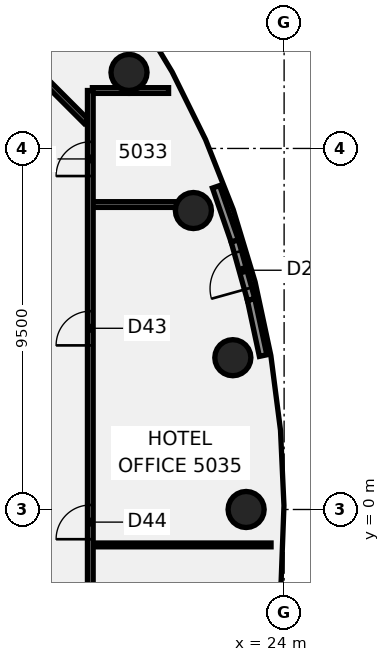
"""IFC4 building model, lengths in metres.
Left out: names, types, materials, properties, quantities, classifications, styles, units other than length and angle.
Written with IfcOpenShell. Run it as: python <this file> out.ifc"""

import sys

from ifc_helpers import new_model, si_unit, direction, frame, frame_2d, origin, origin_2d, place, context, subcontext, project, spatial, rectangle, circle, extrude, element, fill, save


model = new_model("IFC4")
c1 = context("Model", 3, precision=1e-05, world=origin(), true_north=direction((0.0, 1.0)))
c2 = subcontext(c1, "Body", "Model", "MODEL_VIEW")
j1 = project(units=[si_unit("LENGTHUNIT", "METRE"), si_unit("PLANEANGLEUNIT", "RADIAN")], contexts=[c1])
p1 = place(None, origin())
s1 = spatial("IfcSite", under=j1, at=p1, CompositionType="ELEMENT")
p2 = place(p1, origin())
s2 = spatial("IfcBuilding", under=s1, at=p2, CompositionType="ELEMENT")
p3 = place(p2, frame((0.0, 0.0, 200.5)))
s3 = spatial("IfcBuildingStorey", under=s2, at=p3, CompositionType="ELEMENT", Elevation=200.5)
for number, where, z_axis, x_axis in (
    (1, (23.0, 0.0, -0.14), (0.0, 0.0, 1.0), (1.0, 0.0, 0.0)),
    (2, (22.651, 3.994, -0.14), (0.0, 0.0, 1.0), (1.0, 0.0, 0.0)),
    (3, (21.613, 7.866, -0.14), (0.0, 0.0, 1.0), (1.0, 0.0, 0.0)),
    (4, (19.919, 11.5, -0.14), (0.0, 0.0, 1.0), (1.0, 0.0, 0.0)),
):
    element("IfcColumn", number, at=place(p3, frame(where, z_axis=z_axis, x_axis=x_axis)), inside=s3, PredefinedType="COLUMN", context=c2, shape_type="SweptSolid", body=[
        extrude(circle(Radius=0.475, at=origin_2d()), origin(), (0.0, 0.0, 1.0), 3.6),
    ])
p4 = place(p3, frame((17.128, 11.872, 0.0), z_axis=(0.0, 0.0, 1.0), x_axis=(0.707106781187, -0.707106781187, 0.0)))
e5 = element("IfcWall", 5, at=p4, inside=s3, PredefinedType="PARTITIONING", context=c2, shape_type="SweptSolid", body=[
    extrude(rectangle(XDim=2.35, YDim=0.15, at=frame_2d((1.175, 0.0))), origin(), (0.0, 0.0, 1.0), 2.864),
])
p5 = place(p3, frame((18.955, -0.932, 0.0), z_axis=(0.0, 0.0, 1.0), x_axis=(1.0, 0.0, 0.0)))
e6 = element("IfcWall", 6, at=p5, inside=s3, PredefinedType="PARTITIONING", context=c2, shape_type="SweptSolid", body=[
    extrude(rectangle(XDim=4.701, YDim=0.1, at=frame_2d((2.351, 0.0))), origin(), (0.0, 0.0, 1.0), 2.864),
])
p6 = place(p3, frame((18.955, 8.024, 0.0), z_axis=(0.0, 0.0, 1.0), x_axis=(1.0, 0.0, 0.0)))
e7 = element("IfcWall", 7, at=p6, inside=s3, PredefinedType="PARTITIONING", context=c2, shape_type="SweptSolid", body=[
    extrude(rectangle(XDim=2.215, YDim=0.15, at=frame_2d((1.107, 0.0))), origin(), (0.0, 0.0, 1.0), 2.864),
])
p7 = place(p3, frame((18.955, 11.024, 0.0), z_axis=(0.0, 0.0, 1.0), x_axis=(1.0, 0.0, 0.0)))
e8 = element("IfcWall", 8, at=p7, inside=s3, PredefinedType="PARTITIONING", context=c2, shape_type="SweptSolid", body=[
    extrude(rectangle(XDim=0.93, YDim=0.15, at=frame_2d((0.465, 0.0))), origin(), (0.0, 0.0, 1.0), 2.864),
])
p8 = place(p3, frame((19.952, 11.024, 0.0), z_axis=(0.0, 0.0, 1.0), x_axis=(1.0, 0.0, 0.0)))
e9 = element("IfcWall", 9, at=p8, inside=s3, PredefinedType="PARTITIONING", context=c2, shape_type="SweptSolid", body=[
    extrude(rectangle(XDim=1.008, YDim=0.15, at=frame_2d((0.504, 0.0))), origin(), (0.0, 0.0, 1.0), 2.864),
])
p9 = place(p3, frame((18.9, -10.1, 0.0), z_axis=(0.0, 0.0, 1.0), x_axis=(0.0, 1.0, 0.0)))
e10 = element("IfcWall", 10, at=p9, inside=s3, PredefinedType="PARTITIONING", context=c2, shape_type="SweptSolid", body=[
    extrude(rectangle(XDim=21.124, YDim=0.15, at=frame_2d((10.562, 0.0))), origin(), (0.0, 0.0, 1.0), 2.864),
])
p10 = place(p9, frame((18.874, 0.0, 0.0)))
e11 = element("IfcOpeningElement", 11, at=p10, cuts=e10, PredefinedType="OPENING", context=c2, shape_type="SweptSolid", body=[
    extrude(rectangle(XDim=0.9, YDim=2.1, at=frame_2d((0.45, 1.05))), frame((0.0, 0.085, 0.0), z_axis=(0.0, -1.0, 0.0), x_axis=(1.0, 0.0, 0.0)), (0.0, 0.0, 1.0), 0.17),
])
p11 = place(p9, frame((0.9, 0.0, 0.0)))
e12 = element("IfcOpeningElement", 12, at=p11, cuts=e10, PredefinedType="OPENING", context=c2, shape_type="SweptSolid", body=[
    extrude(rectangle(XDim=1.8, YDim=2.1, at=frame_2d((0.9, 1.05))), frame((0.0, 0.085, 0.0), z_axis=(0.0, -1.0, 0.0), x_axis=(1.0, 0.0, 0.0)), (0.0, 0.0, 1.0), 0.17),
])
p12 = place(p9, frame((14.418, 0.0, 0.0)))
e13 = element("IfcOpeningElement", 13, at=p12, cuts=e10, PredefinedType="OPENING", context=c2, shape_type="SweptSolid", body=[
    extrude(rectangle(XDim=0.9, YDim=2.1, at=frame_2d((0.45, 1.05))), frame((0.0, 0.085, 0.0), z_axis=(0.0, -1.0, 0.0), x_axis=(1.0, 0.0, 0.0)), (0.0, 0.0, 1.0), 0.17),
])
p13 = place(p9, frame((9.318, 0.0, 0.0)))
e14 = element("IfcOpeningElement", 14, at=p13, cuts=e10, PredefinedType="OPENING", context=c2, shape_type="SweptSolid", body=[
    extrude(rectangle(XDim=0.9, YDim=2.1, at=frame_2d((0.45, 1.05))), frame((0.0, 0.085, 0.0), z_axis=(0.0, -1.0, 0.0), x_axis=(1.0, 0.0, 0.0)), (0.0, 0.0, 1.0), 0.17),
])
p14 = place(p3, frame((23.447, 4.049, 0.0), z_axis=(0.0, 0.0, 1.0), x_axis=(-0.209319188687, 0.977847369096, 0.0)))
e15 = element("IfcWall", 15, at=p14, inside=s3, PredefinedType="SOLIDWALL", context=c2, shape_type="SweptSolid", body=[
    extrude(rectangle(XDim=1.509, YDim=0.2, at=frame_2d((0.755, 0.0))), origin(), (0.0, 0.0, 1.0), 3.46),
])
p15 = place(p3, frame((22.702, 7.065, 0.0), z_axis=(0.0, 0.0, 1.0), x_axis=(-0.326893678877, 0.945061121151, 0.0)))
e16 = element("IfcWall", 16, at=p15, inside=s3, PredefinedType="SOLIDWALL", context=c2, shape_type="SweptSolid", body=[
    extrude(rectangle(XDim=1.508, YDim=0.2, at=frame_2d((0.754, 0.0))), origin(), (0.0, 0.0, 1.0), 3.46),
])
p16 = place(p3, frame((23.131, 5.525, 0.0), z_axis=(0.0, 0.0, 1.0), x_axis=(-0.268423397607, 0.963301032708, 0.0)))
e17 = element("IfcWall", 17, at=p16, inside=s3, PredefinedType="SOLIDWALL", context=c2, shape_type="SweptSolid", body=[
    extrude(rectangle(XDim=1.599, YDim=0.2, at=frame_2d((0.799, 0.0))), origin(), (0.0, 0.0, 1.0), 3.46),
])
p17 = place(p16, frame((0.3, 0.0, 0.0)))
e18 = element("IfcOpeningElement", 18, at=p17, cuts=e17, PredefinedType="OPENING", context=c2, shape_type="SweptSolid", body=[
    extrude(rectangle(XDim=1.0, YDim=2.4, at=frame_2d((0.5, 1.2))), frame((0.0, 0.11, 0.0), z_axis=(0.0, -1.0, 0.0), x_axis=(1.0, 0.0, 0.0)), (0.0, 0.0, 1.0), 0.22),
])
p18 = place(p10, frame((0.9, 0.0, 0.0), z_axis=(0.0, 0.0, 1.0), x_axis=(-1.0, 0.0, 0.0)))
e19 = element("IfcDoor", 19, at=p18, inside=s3, OperationType="SINGLE_SWING_RIGHT", PredefinedType="DOOR", context=c2, shape_type="SweptSolid", body=[
    extrude(rectangle(XDim=0.9, YDim=2.1, at=frame_2d((0.45, 1.05))), frame((0.0, 0.025, 0.0), z_axis=(0.0, -1.0, 0.0), x_axis=(1.0, 0.0, 0.0)), (0.0, 0.0, 1.0), 0.05),
])
fill(e11, e19)
p19 = place(p12, frame((0.9, 0.0, 0.0), z_axis=(0.0, 0.0, 1.0), x_axis=(-1.0, 0.0, 0.0)))
e20 = element("IfcDoor", 20, at=p19, inside=s3, OperationType="SINGLE_SWING_RIGHT", PredefinedType="DOOR", context=c2, shape_type="SweptSolid", body=[
    extrude(rectangle(XDim=0.9, YDim=2.1, at=frame_2d((0.45, 1.05))), frame((0.0, 0.025, 0.0), z_axis=(0.0, -1.0, 0.0), x_axis=(1.0, 0.0, 0.0)), (0.0, 0.0, 1.0), 0.05),
])
fill(e13, e20)
p20 = place(p13, frame((0.9, 0.0, 0.0), z_axis=(0.0, 0.0, 1.0), x_axis=(-1.0, 0.0, 0.0)))
e21 = element("IfcDoor", 21, at=p20, inside=s3, OperationType="SINGLE_SWING_LEFT", PredefinedType="DOOR", context=c2, shape_type="SweptSolid", body=[
    extrude(rectangle(XDim=0.9, YDim=2.1, at=frame_2d((0.45, 1.05))), frame((0.0, 0.025, 0.0), z_axis=(0.0, -1.0, 0.0), x_axis=(1.0, 0.0, 0.0)), (0.0, 0.0, 1.0), 0.05),
])
fill(e14, e21)
p21 = place(p17, origin())
e22 = element("IfcDoor", 22, at=p21, inside=s3, OperationType="SINGLE_SWING_LEFT", PredefinedType="DOOR", context=c2, shape_type="SweptSolid", body=[
    extrude(rectangle(XDim=1.0, YDim=2.4, at=frame_2d((0.5, 1.2))), frame((0.0, 0.025, 0.0), z_axis=(0.0, -1.0, 0.0), x_axis=(1.0, 0.0, 0.0)), (0.0, 0.0, 1.0), 0.05),
])
fill(e18, e22)
save(model, sys.argv[1])
